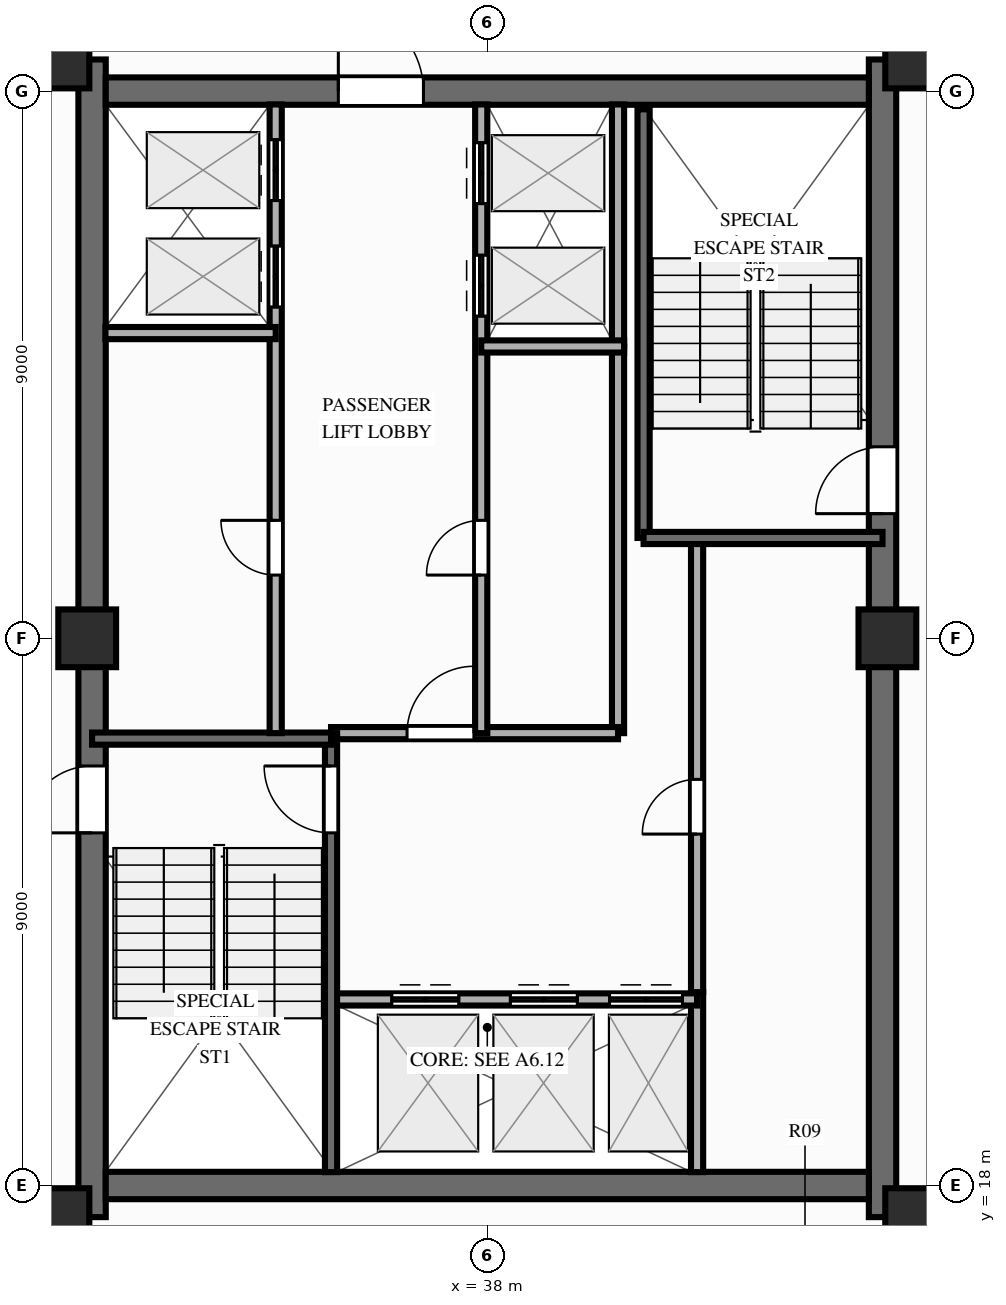
"""IFC4 building model, lengths in metres.
Left out: names, types, materials, properties, quantities, classifications, styles, units other than length and angle.
Written with IfcOpenShell. Run it as: python <this file> out.ifc"""

import sys

from ifc_helpers import new_model, si_unit, direction, frame, frame_2d, origin, origin_2d, place, context, subcontext, project, spatial, rectangle, extrude, source, transform, mapped, element, fill, save


model = new_model("IFC4")
c1 = context("Model", 3, precision=1e-05, world=origin(), true_north=direction((0.0, 1.0)))
c2 = subcontext(c1, "Body", "Model", "MODEL_VIEW")
j1 = project(units=[si_unit("LENGTHUNIT", "METRE"), si_unit("PLANEANGLEUNIT", "RADIAN")], contexts=[c1])
p1 = place(None, origin())
s1 = spatial("IfcSite", under=j1, at=p1, CompositionType="ELEMENT")
p2 = place(p1, origin())
s2 = spatial("IfcBuilding", under=s1, at=p2, CompositionType="ELEMENT")
p3 = place(p2, frame((0.0, 0.0, 226.2)))
s3 = spatial("IfcBuildingStorey", under=s2, at=p3, CompositionType="ELEMENT", Elevation=226.2)
p4 = place(p3, frame((31.5, 17.48, 0.0), z_axis=(0.0, 0.0, 1.0), x_axis=(0.0, 1.0, 0.0)))
e1 = element("IfcWall", 1, at=p4, inside=s3, PredefinedType="SHEAR", context=c2, shape_type="SweptSolid", body=[
    extrude(rectangle(XDim=19.04, YDim=0.45, at=frame_2d((9.52, 0.0))), origin(), (0.0, 0.0, 1.0), 3.9),
])
p5 = place(p4, frame((6.32, 0.0, 0.0)))
e2 = element("IfcOpeningElement", 2, at=p5, cuts=e1, PredefinedType="OPENING", context=c2, shape_type="SweptSolid", body=[
    extrude(rectangle(XDim=1.1, YDim=2.15, at=frame_2d((0.55, 1.075))), frame((0.0, 0.237, 0.0), z_axis=(0.0, -1.0, 0.0), x_axis=(1.0, 0.0, 0.0)), (0.0, 0.0, 1.0), 0.474),
])
p6 = place(p3, frame((44.5, 17.48, 0.0), z_axis=(0.0, 0.0, 1.0), x_axis=(0.0, 1.0, 0.0)))
e3 = element("IfcWall", 3, at=p6, inside=s3, PredefinedType="SHEAR", context=c2, shape_type="SweptSolid", body=[
    extrude(rectangle(XDim=19.04, YDim=0.45, at=frame_2d((9.52, 0.0))), origin(), (0.0, 0.0, 1.0), 3.9),
])
p7 = place(p6, frame((12.67, 0.0, 0.0), z_axis=(0.0, 0.0, 1.0), x_axis=(-1.0, 0.0, 0.0)))
e4 = element("IfcOpeningElement", 4, at=p7, cuts=e3, PredefinedType="OPENING", context=c2, shape_type="SweptSolid", body=[
    extrude(rectangle(XDim=1.1, YDim=2.15, at=frame_2d((0.55, 1.075))), frame((0.0, 0.237, 0.0), z_axis=(0.0, -1.0, 0.0), x_axis=(1.0, 0.0, 0.0)), (0.0, 0.0, 1.0), 0.474),
])
p8 = place(p3, frame((31.725, 18.0, 0.0), z_axis=(0.0, 0.0, 1.0), x_axis=(1.0, 0.0, 0.0)))
e5 = element("IfcWall", 5, at=p8, inside=s3, PredefinedType="SHEAR", context=c2, shape_type="SweptSolid", body=[
    extrude(rectangle(XDim=12.55, YDim=0.45, at=frame_2d((6.275, 0.0))), origin(), (0.0, 0.0, 1.0), 3.9),
])
p9 = place(p3, frame((31.725, 36.0, 0.0), z_axis=(0.0, 0.0, 1.0), x_axis=(1.0, 0.0, 0.0)))
e6 = element("IfcWall", 6, at=p9, inside=s3, PredefinedType="SHEAR", context=c2, shape_type="SweptSolid", body=[
    extrude(rectangle(XDim=12.55, YDim=0.45, at=frame_2d((6.275, 0.0))), origin(), (0.0, 0.0, 1.0), 3.9),
])
p10 = place(p9, frame((5.225, 0.0, 0.0), z_axis=(0.0, 0.0, 1.0), x_axis=(-1.0, 0.0, 0.0)))
e7 = element("IfcOpeningElement", 7, at=p10, cuts=e6, PredefinedType="OPENING", context=c2, shape_type="SweptSolid", body=[
    extrude(rectangle(XDim=1.4, YDim=2.15, at=frame_2d((0.7, 1.075))), frame((0.0, 0.237, 0.0), z_axis=(0.0, -1.0, 0.0), x_axis=(1.0, 0.0, 0.0)), (0.0, 0.0, 1.0), 0.474),
])
m1 = source(origin(), c2, "Body", "SweptSolid", [
    extrude(rectangle(XDim=0.95, YDim=0.95, at=origin_2d()), origin(), (0.0, 0.0, 1.0), 3.9),
])
for number, where, z_axis, x_axis in (
    (8, (30.98, 17.48, 0.0), (0.0, 0.0, 1.0), (1.0, 0.0, 0.0)),
    (9, (45.02, 17.48, 0.0), (0.0, 0.0, 1.0), (1.0, 0.0, 0.0)),
    (10, (30.98, 36.52, 0.0), (0.0, 0.0, 1.0), (1.0, 0.0, 0.0)),
    (11, (45.02, 36.52, 0.0), (0.0, 0.0, 1.0), (1.0, 0.0, 0.0)),
    (12, (31.42, 27.0, 0.0), (0.0, 0.0, 1.0), (1.0, 0.0, 0.0)),
    (13, (44.58, 27.0, 0.0), (0.0, 0.0, 1.0), (1.0, 0.0, 0.0)),
):
    element("IfcColumn", number, at=place(p3, frame(where, z_axis=z_axis, x_axis=x_axis)), inside=s3, PredefinedType="COLUMN", context=c2, shape_type="MappedRepresentation", body=[
        mapped(m1, transform((0.0, 0.0, 0.0), scale=1.0)),
    ])
p11 = place(p3, frame((41.45, 18.22, 0.0), z_axis=(0.0, 0.0, 1.0), x_axis=(0.0, 1.0, 0.0)))
e14 = element("IfcWall", 14, at=p11, inside=s3, PredefinedType="PARTITIONING", context=c2, shape_type="SweptSolid", body=[
    extrude(rectangle(XDim=2.96, YDim=0.2, at=frame_2d((1.48, 0.0))), origin(), (0.0, 0.0, 1.0), 3.69),
])
p12 = place(p3, frame((41.45, 21.18, 0.0), z_axis=(0.0, 0.0, 1.0), x_axis=(0.0, 1.0, 0.0)))
e15 = element("IfcWall", 15, at=p12, inside=s3, PredefinedType="PARTITIONING", context=c2, shape_type="SweptSolid", body=[
    extrude(rectangle(XDim=7.42, YDim=0.2, at=frame_2d((3.71, 0.0))), origin(), (0.0, 0.0, 1.0), 3.69),
])
p13 = place(p12, frame((2.6, 0.0, 0.0)))
e16 = element("IfcOpeningElement", 16, at=p13, cuts=e15, PredefinedType="OPENING", context=c2, shape_type="SweptSolid", body=[
    extrude(rectangle(XDim=0.9, YDim=2.1, at=frame_2d((0.45, 1.05))), frame((0.0, 0.112, 0.0), z_axis=(0.0, -1.0, 0.0), x_axis=(1.0, 0.0, 0.0)), (0.0, 0.0, 1.0), 0.224),
])
p14 = place(p3, frame((40.15, 25.44, 0.0), z_axis=(0.0, 0.0, 1.0), x_axis=(0.0, 1.0, 0.0)))
e17 = element("IfcWall", 17, at=p14, inside=s3, PredefinedType="PARTITIONING", context=c2, shape_type="SweptSolid", body=[
    extrude(rectangle(XDim=6.36, YDim=0.2, at=frame_2d((3.18, 0.0))), origin(), (0.0, 0.0, 1.0), 3.69),
])
p15 = place(p3, frame((40.15, 31.8, 0.0), z_axis=(0.0, 0.0, 1.0), x_axis=(0.0, 1.0, 0.0)))
e18 = element("IfcWall", 18, at=p15, inside=s3, PredefinedType="PARTITIONING", context=c2, shape_type="SweptSolid", body=[
    extrude(rectangle(XDim=3.98, YDim=0.2, at=frame_2d((1.99, 0.0))), origin(), (0.0, 0.0, 1.0), 3.69),
])
p16 = place(p3, frame((35.43, 21.06, 0.0), z_axis=(0.0, 0.0, 1.0), x_axis=(1.0, 0.0, 0.0)))
e19 = element("IfcWall", 19, at=p16, inside=s3, PredefinedType="PARTITIONING", context=c2, shape_type="SweptSolid", body=[
    extrude(rectangle(XDim=6.02, YDim=0.2, at=frame_2d((3.01, 0.0))), origin(), (0.0, 0.0, 1.0), 3.69),
])
p17 = place(p16, frame((1.0, 0.0, 0.0)))
e20 = element("IfcOpeningElement", 20, at=p17, cuts=e19, PredefinedType="OPENING", context=c2, shape_type="SweptSolid", body=[
    extrude(rectangle(XDim=1.1, YDim=2.15, at=frame_2d((0.55, 1.075))), frame((0.0, 0.112, 0.0), z_axis=(0.0, -1.0, 0.0), x_axis=(1.0, 0.0, 0.0)), (0.0, 0.0, 1.0), 0.224),
])
p18 = place(p16, frame((2.95, 0.0, 0.0)))
e21 = element("IfcOpeningElement", 21, at=p18, cuts=e19, PredefinedType="OPENING", context=c2, shape_type="SweptSolid", body=[
    extrude(rectangle(XDim=1.1, YDim=2.15, at=frame_2d((0.55, 1.075))), frame((0.0, 0.112, 0.0), z_axis=(0.0, -1.0, 0.0), x_axis=(1.0, 0.0, 0.0)), (0.0, 0.0, 1.0), 0.224),
])
p19 = place(p16, frame((4.58, 0.0, 0.0)))
e22 = element("IfcOpeningElement", 22, at=p19, cuts=e19, PredefinedType="OPENING", context=c2, shape_type="SweptSolid", body=[
    extrude(rectangle(XDim=1.2, YDim=2.15, at=frame_2d((0.6, 1.075))), frame((0.0, 0.112, 0.0), z_axis=(0.0, -1.0, 0.0), x_axis=(1.0, 0.0, 0.0)), (0.0, 0.0, 1.0), 0.224),
])
p20 = place(p3, frame((35.43, 25.44, 0.0), z_axis=(0.0, 0.0, 1.0), x_axis=(1.0, 0.0, 0.0)))
e23 = element("IfcWall", 23, at=p20, inside=s3, PredefinedType="PARTITIONING", context=c2, shape_type="SweptSolid", body=[
    extrude(rectangle(XDim=4.72, YDim=0.2, at=frame_2d((2.36, 0.0))), origin(), (0.0, 0.0, 1.0), 3.69),
])
p21 = place(p20, frame((1.25, 0.0, 0.0)))
e24 = element("IfcOpeningElement", 24, at=p21, cuts=e23, PredefinedType="OPENING", context=c2, shape_type="SweptSolid", body=[
    extrude(rectangle(XDim=1.1, YDim=2.15, at=frame_2d((0.55, 1.075))), frame((0.0, 0.112, 0.0), z_axis=(0.0, -1.0, 0.0), x_axis=(1.0, 0.0, 0.0)), (0.0, 0.0, 1.0), 0.224),
])
p22 = place(p3, frame((35.43, 18.22, 0.0), z_axis=(0.0, 0.0, 1.0), x_axis=(0.0, 1.0, 0.0)))
e25 = element("IfcWall", 25, at=p22, inside=s3, PredefinedType="SOLIDWALL", context=c2, shape_type="SweptSolid", body=[
    extrude(rectangle(XDim=7.22, YDim=0.2, at=frame_2d((3.61, 0.0))), origin(), (0.0, 0.0, 1.0), 3.69),
])
p23 = place(p22, frame((6.68, 0.0, 0.0), z_axis=(0.0, 0.0, 1.0), x_axis=(-1.0, 0.0, 0.0)))
e26 = element("IfcOpeningElement", 26, at=p23, cuts=e25, PredefinedType="OPENING", context=c2, shape_type="SweptSolid", body=[
    extrude(rectangle(XDim=1.1, YDim=2.15, at=frame_2d((0.55, 1.075))), frame((0.0, 0.112, 0.0), z_axis=(0.0, -1.0, 0.0), x_axis=(1.0, 0.0, 0.0)), (0.0, 0.0, 1.0), 0.224),
])
p24 = place(p3, frame((31.5, 25.35, 0.0), z_axis=(0.0, 0.0, 1.0), x_axis=(1.0, 0.0, 0.0)))
e27 = element("IfcWall", 27, at=p24, inside=s3, PredefinedType="SOLIDWALL", context=c2, shape_type="SweptSolid", body=[
    extrude(rectangle(XDim=3.93, YDim=0.2, at=frame_2d((1.965, 0.0))), origin(), (0.0, 0.0, 1.0), 3.69),
])
p25 = place(p3, frame((40.57, 28.65, 0.0), z_axis=(0.0, 0.0, 1.0), x_axis=(0.0, 1.0, 0.0)))
e28 = element("IfcWall", 28, at=p25, inside=s3, PredefinedType="SOLIDWALL", context=c2, shape_type="SweptSolid", body=[
    extrude(rectangle(XDim=7.05, YDim=0.2, at=frame_2d((3.525, 0.0))), origin(), (0.0, 0.0, 1.0), 3.69),
])
p26 = place(p3, frame((40.57, 28.65, 0.0), z_axis=(0.0, 0.0, 1.0), x_axis=(1.0, 0.0, 0.0)))
e29 = element("IfcWall", 29, at=p26, inside=s3, PredefinedType="SOLIDWALL", context=c2, shape_type="SweptSolid", body=[
    extrude(rectangle(XDim=3.93, YDim=0.2, at=frame_2d((1.965, 0.0))), origin(), (0.0, 0.0, 1.0), 3.69),
])
p27 = place(p3, frame((34.52, 25.44, 0.0), z_axis=(0.0, 0.0, 1.0), x_axis=(0.0, 1.0, 0.0)))
e30 = element("IfcWall", 30, at=p27, inside=s3, PredefinedType="PARTITIONING", context=c2, shape_type="SweptSolid", body=[
    extrude(rectangle(XDim=10.34, YDim=0.2, at=frame_2d((5.17, 0.0))), origin(), (0.0, 0.0, 1.0), 3.69),
])
p28 = place(p27, frame((2.6, 0.0, 0.0)))
e31 = element("IfcOpeningElement", 31, at=p28, cuts=e30, PredefinedType="OPENING", context=c2, shape_type="SweptSolid", body=[
    extrude(rectangle(XDim=0.9, YDim=2.1, at=frame_2d((0.45, 1.05))), frame((0.0, 0.112, 0.0), z_axis=(0.0, -1.0, 0.0), x_axis=(1.0, 0.0, 0.0)), (0.0, 0.0, 1.0), 0.224),
])
p29 = place(p27, frame((7.01, 0.0, 0.0)))
e32 = element("IfcOpeningElement", 32, at=p29, cuts=e30, PredefinedType="OPENING", context=c2, shape_type="SweptSolid", body=[
    extrude(rectangle(XDim=1.0, YDim=2.15, at=frame_2d((0.5, 1.075))), frame((0.0, 0.112, 0.0), z_axis=(0.0, -1.0, 0.0), x_axis=(1.0, 0.0, 0.0)), (0.0, 0.0, 1.0), 0.224),
])
p30 = place(p27, frame((8.76, 0.0, 0.0)))
e33 = element("IfcOpeningElement", 33, at=p30, cuts=e30, PredefinedType="OPENING", context=c2, shape_type="SweptSolid", body=[
    extrude(rectangle(XDim=1.0, YDim=2.15, at=frame_2d((0.5, 1.075))), frame((0.0, 0.112, 0.0), z_axis=(0.0, -1.0, 0.0), x_axis=(1.0, 0.0, 0.0)), (0.0, 0.0, 1.0), 0.224),
])
p31 = place(p3, frame((31.72, 32.02, 0.0), z_axis=(0.0, 0.0, 1.0), x_axis=(1.0, 0.0, 0.0)))
e34 = element("IfcWall", 34, at=p31, inside=s3, PredefinedType="PARTITIONING", context=c2, shape_type="SweptSolid", body=[
    extrude(rectangle(XDim=2.8, YDim=0.2, at=frame_2d((1.4, 0.0))), origin(), (0.0, 0.0, 1.0), 3.69),
])
p32 = place(p3, frame((37.9, 25.44, 0.0), z_axis=(0.0, 0.0, 1.0), x_axis=(0.0, 1.0, 0.0)))
e35 = element("IfcWall", 35, at=p32, inside=s3, PredefinedType="PARTITIONING", context=c2, shape_type="SweptSolid", body=[
    extrude(rectangle(XDim=10.34, YDim=0.2, at=frame_2d((5.17, 0.0))), origin(), (0.0, 0.0, 1.0), 3.69),
])
p33 = place(p32, frame((2.6, 0.0, 0.0)))
e36 = element("IfcOpeningElement", 36, at=p33, cuts=e35, PredefinedType="OPENING", context=c2, shape_type="SweptSolid", body=[
    extrude(rectangle(XDim=0.9, YDim=2.1, at=frame_2d((0.45, 1.05))), frame((0.0, 0.112, 0.0), z_axis=(0.0, -1.0, 0.0), x_axis=(1.0, 0.0, 0.0)), (0.0, 0.0, 1.0), 0.224),
])
p34 = place(p32, frame((6.86, 0.0, 0.0)))
e37 = element("IfcOpeningElement", 37, at=p34, cuts=e35, PredefinedType="OPENING", context=c2, shape_type="SweptSolid", body=[
    extrude(rectangle(XDim=1.0, YDim=2.15, at=frame_2d((0.5, 1.075))), frame((0.0, 0.112, 0.0), z_axis=(0.0, -1.0, 0.0), x_axis=(1.0, 0.0, 0.0)), (0.0, 0.0, 1.0), 0.224),
])
p35 = place(p32, frame((8.71, 0.0, 0.0)))
e38 = element("IfcOpeningElement", 38, at=p35, cuts=e35, PredefinedType="OPENING", context=c2, shape_type="SweptSolid", body=[
    extrude(rectangle(XDim=1.0, YDim=2.15, at=frame_2d((0.5, 1.075))), frame((0.0, 0.112, 0.0), z_axis=(0.0, -1.0, 0.0), x_axis=(1.0, 0.0, 0.0)), (0.0, 0.0, 1.0), 0.224),
])
p36 = place(p3, frame((37.9, 31.8, 0.0), z_axis=(0.0, 0.0, 1.0), x_axis=(1.0, 0.0, 0.0)))
e39 = element("IfcWall", 39, at=p36, inside=s3, PredefinedType="PARTITIONING", context=c2, shape_type="SweptSolid", body=[
    extrude(rectangle(XDim=2.35, YDim=0.2, at=frame_2d((1.175, 0.0))), origin(), (0.0, 0.0, 1.0), 3.69),
])
m2 = source(origin(), c2, "Body", "SweptSolid", [
    extrude(rectangle(XDim=1.1, YDim=2.15, at=frame_2d((0.55, 1.075))), frame((0.0, 0.025, 0.0), z_axis=(0.0, -1.0, 0.0), x_axis=(1.0, 0.0, 0.0)), (0.0, 0.0, 1.0), 0.05),
])
p37 = place(p5, origin())
e40 = element("IfcDoor", 40, at=p37, inside=s3, OperationType="SINGLE_SWING_LEFT", PredefinedType="DOOR", context=c2, shape_type="MappedRepresentation", body=[
    mapped(m2, transform((0.0, 0.0, 0.0), scale=1.0)),
])
fill(e2, e40)
p38 = place(p7, origin())
e41 = element("IfcDoor", 41, at=p38, inside=s3, OperationType="SINGLE_SWING_RIGHT", PredefinedType="DOOR", context=c2, shape_type="MappedRepresentation", body=[
    mapped(m2, transform((0.0, 0.0, 0.0), scale=1.0)),
])
fill(e4, e41)
m3 = source(origin(), c2, "Body", "SweptSolid", [
    extrude(rectangle(XDim=1.4, YDim=2.15, at=frame_2d((0.7, 1.075))), frame((0.0, 0.025, 0.0), z_axis=(0.0, -1.0, 0.0), x_axis=(1.0, 0.0, 0.0)), (0.0, 0.0, 1.0), 0.05),
])
p39 = place(p10, origin())
e42 = element("IfcDoor", 42, at=p39, inside=s3, OperationType="SINGLE_SWING_RIGHT", PredefinedType="DOOR", context=c2, shape_type="MappedRepresentation", body=[
    mapped(m3, transform((0.0, 0.0, 0.0), scale=1.0)),
])
fill(e7, e42)
m4 = source(origin(), c2, "Body", "SweptSolid", [
    extrude(rectangle(XDim=0.9, YDim=2.1, at=frame_2d((0.45, 1.05))), frame((0.0, 0.025, 0.0), z_axis=(0.0, -1.0, 0.0), x_axis=(1.0, 0.0, 0.0)), (0.0, 0.0, 1.0), 0.05),
])
p40 = place(p13, origin())
e43 = element("IfcDoor", 43, at=p40, inside=s3, OperationType="SINGLE_SWING_LEFT", PredefinedType="DOOR", context=c2, shape_type="MappedRepresentation", body=[
    mapped(m4, transform((0.0, 0.0, 0.0), scale=1.0)),
])
fill(e16, e43)
p41 = place(p17, origin())
e44 = element("IfcDoor", 44, at=p41, inside=s3, OperationType="DOUBLE_DOOR_SLIDING", PredefinedType="DOOR", context=c2, shape_type="MappedRepresentation", body=[
    mapped(m2, transform((0.0, 0.0, 0.0), scale=1.0)),
])
fill(e20, e44)
p42 = place(p18, origin())
e45 = element("IfcDoor", 45, at=p42, inside=s3, OperationType="DOUBLE_DOOR_SLIDING", PredefinedType="DOOR", context=c2, shape_type="MappedRepresentation", body=[
    mapped(m2, transform((0.0, 0.0, 0.0), scale=1.0)),
])
fill(e21, e45)
m5 = source(origin(), c2, "Body", "SweptSolid", [
    extrude(rectangle(XDim=1.2, YDim=2.15, at=frame_2d((0.6, 1.075))), frame((0.0, 0.025, 0.0), z_axis=(0.0, -1.0, 0.0), x_axis=(1.0, 0.0, 0.0)), (0.0, 0.0, 1.0), 0.05),
])
p43 = place(p19, origin())
e46 = element("IfcDoor", 46, at=p43, inside=s3, OperationType="DOUBLE_DOOR_SLIDING", PredefinedType="DOOR", context=c2, shape_type="MappedRepresentation", body=[
    mapped(m5, transform((0.0, 0.0, 0.0), scale=1.0)),
])
fill(e22, e46)
p44 = place(p21, origin())
e47 = element("IfcDoor", 47, at=p44, inside=s3, OperationType="SINGLE_SWING_RIGHT", PredefinedType="DOOR", context=c2, shape_type="MappedRepresentation", body=[
    mapped(m2, transform((0.0, 0.0, 0.0), scale=1.0)),
])
fill(e24, e47)
p45 = place(p23, origin())
e48 = element("IfcDoor", 48, at=p45, inside=s3, OperationType="SINGLE_SWING_LEFT", PredefinedType="DOOR", context=c2, shape_type="MappedRepresentation", body=[
    mapped(m2, transform((0.0, 0.0, 0.0), scale=1.0)),
])
fill(e26, e48)
p46 = place(p28, origin())
e49 = element("IfcDoor", 49, at=p46, inside=s3, OperationType="SINGLE_SWING_RIGHT", PredefinedType="DOOR", context=c2, shape_type="MappedRepresentation", body=[
    mapped(m4, transform((0.0, 0.0, 0.0), scale=1.0)),
])
fill(e31, e49)
m6 = source(origin(), c2, "Body", "SweptSolid", [
    extrude(rectangle(XDim=1.0, YDim=2.15, at=frame_2d((0.5, 1.075))), frame((0.0, 0.025, 0.0), z_axis=(0.0, -1.0, 0.0), x_axis=(1.0, 0.0, 0.0)), (0.0, 0.0, 1.0), 0.05),
])
p47 = place(p29, origin())
e50 = element("IfcDoor", 50, at=p47, inside=s3, OperationType="DOUBLE_DOOR_SLIDING", PredefinedType="DOOR", context=c2, shape_type="MappedRepresentation", body=[
    mapped(m6, transform((0.0, 0.0, 0.0), scale=1.0)),
])
fill(e32, e50)
p48 = place(p30, origin())
e51 = element("IfcDoor", 51, at=p48, inside=s3, OperationType="DOUBLE_DOOR_SLIDING", PredefinedType="DOOR", context=c2, shape_type="MappedRepresentation", body=[
    mapped(m6, transform((0.0, 0.0, 0.0), scale=1.0)),
])
fill(e33, e51)
p49 = place(p33, origin())
e52 = element("IfcDoor", 52, at=p49, inside=s3, OperationType="SINGLE_SWING_LEFT", PredefinedType="DOOR", context=c2, shape_type="MappedRepresentation", body=[
    mapped(m4, transform((0.0, 0.0, 0.0), scale=1.0)),
])
fill(e36, e52)
p50 = place(p34, origin())
e53 = element("IfcDoor", 53, at=p50, inside=s3, OperationType="DOUBLE_DOOR_SLIDING", PredefinedType="DOOR", context=c2, shape_type="MappedRepresentation", body=[
    mapped(m6, transform((0.0, 0.0, 0.0), scale=1.0)),
])
fill(e37, e53)
p51 = place(p35, origin())
e54 = element("IfcDoor", 54, at=p51, inside=s3, OperationType="DOUBLE_DOOR_SLIDING", PredefinedType="DOOR", context=c2, shape_type="MappedRepresentation", body=[
    mapped(m6, transform((0.0, 0.0, 0.0), scale=1.0)),
])
fill(e38, e54)
save(model, sys.argv[1])
